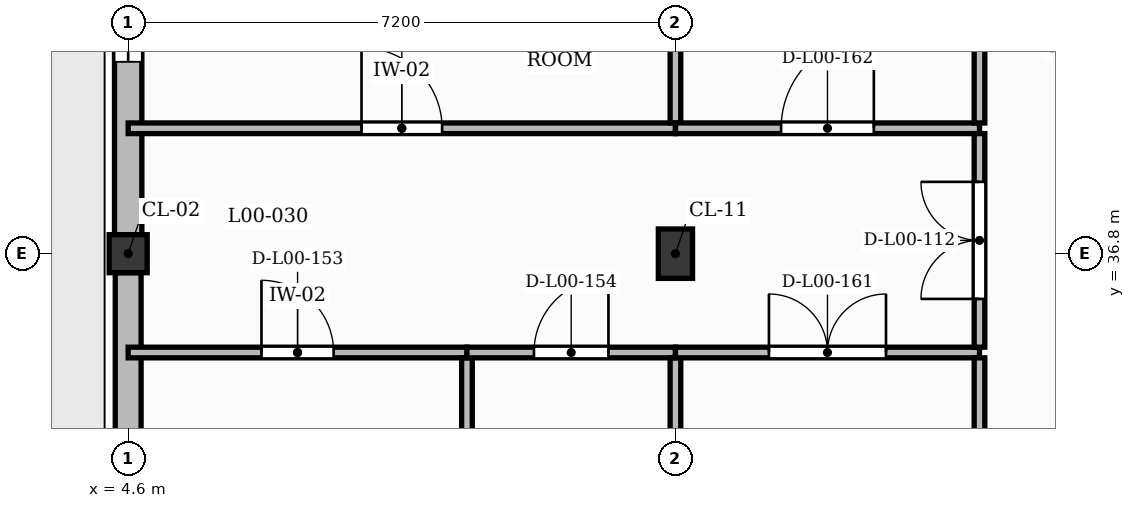
"""IFC4 building model, lengths in metres.
Left out: names, types, materials, properties, quantities, classifications, styles, units other than length and angle.
Written with IfcOpenShell. Run it as: python <this file> out.ifc"""

import sys

from ifc_helpers import new_model, si_unit, direction, frame, frame_2d, origin, origin_2d, place, context, subcontext, project, spatial, rectangle, extrude, element, fill, save


model = new_model("IFC4")
c1 = context("Model", 3, precision=1e-05, world=origin(), true_north=direction((0.0, 1.0)))
c2 = subcontext(c1, "Body", "Model", "MODEL_VIEW")
j1 = project(units=[si_unit("LENGTHUNIT", "METRE"), si_unit("PLANEANGLEUNIT", "RADIAN")], contexts=[c1])
p1 = place(None, origin())
s1 = spatial("IfcSite", under=j1, at=p1, CompositionType="ELEMENT")
p2 = place(p1, origin())
s2 = spatial("IfcBuilding", under=s1, at=p2, CompositionType="ELEMENT")
p3 = place(p2, origin())
s3 = spatial("IfcBuildingStorey", under=s2, at=p3, CompositionType="ELEMENT", Elevation=0.0)
p4 = place(p3, frame((4.6, 36.8, 0.0), z_axis=(0.0, 0.0, 1.0), x_axis=(1.0, 0.0, 0.0)))
e1 = element("IfcColumn", 1, at=p4, inside=s3, PredefinedType="COLUMN", context=c2, shape_type="SweptSolid", body=[
    extrude(rectangle(XDim=0.5, YDim=0.5, at=origin_2d()), origin(), (0.0, 0.0, 1.0), 4.2),
])
p5 = place(p3, frame((11.8, 36.8, 0.0), z_axis=(0.0, 0.0, 1.0), x_axis=(1.0, 0.0, 0.0)))
e2 = element("IfcColumn", 2, at=p5, inside=s3, PredefinedType="COLUMN", context=c2, shape_type="SweptSolid", body=[
    extrude(rectangle(XDim=0.45, YDim=0.65, at=origin_2d()), origin(), (0.0, 0.0, 1.0), 4.2),
])
p6 = place(p3, frame((4.6, 27.5, 0.0), z_axis=(0.0, 0.0, 1.0), x_axis=(0.0, 1.0, 0.0)))
e3 = element("IfcWall", 3, at=p6, inside=s3, PredefinedType="SOLIDWALL", context=c2, shape_type="SweptSolid", body=[
    extrude(rectangle(XDim=9.05, YDim=0.34, at=frame_2d((4.525, 0.0))), origin(), (0.0, 0.0, 1.0), 3.68),
])
p7 = place(p6, frame((2.12, 0.0, 1.0)))
e4 = element("IfcOpeningElement", 4, at=p7, cuts=e3, PredefinedType="OPENING", context=c2, shape_type="SweptSolid", body=[
    extrude(rectangle(XDim=1.6, YDim=2.2, at=frame_2d((0.8, 1.1))), frame((0.0, 0.18, 0.0), z_axis=(0.0, -1.0, 0.0), x_axis=(1.0, 0.0, 0.0)), (0.0, 0.0, 1.0), 0.36),
])
p8 = place(p6, frame((4.4, 0.0, 1.0)))
e5 = element("IfcOpeningElement", 5, at=p8, cuts=e3, PredefinedType="OPENING", context=c2, shape_type="SweptSolid", body=[
    extrude(rectangle(XDim=1.6, YDim=2.2, at=frame_2d((0.8, 1.1))), frame((0.0, 0.18, 0.0), z_axis=(0.0, -1.0, 0.0), x_axis=(1.0, 0.0, 0.0)), (0.0, 0.0, 1.0), 0.36),
])
p9 = place(p3, frame((4.6, 37.05, 0.0), z_axis=(0.0, 0.0, 1.0), x_axis=(0.0, 1.0, 0.0)))
e6 = element("IfcWall", 6, at=p9, inside=s3, PredefinedType="SOLIDWALL", context=c2, shape_type="SweptSolid", body=[
    extrude(rectangle(XDim=8.1, YDim=0.36, at=frame_2d((4.05, 0.0))), origin(), (0.0, 0.0, 1.0), 3.68),
])
p10 = place(p9, frame((2.274, 0.0, 1.0)))
e7 = element("IfcOpeningElement", 7, at=p10, cuts=e6, PredefinedType="OPENING", context=c2, shape_type="SweptSolid", body=[
    extrude(rectangle(XDim=1.08, YDim=1.95, at=frame_2d((0.54, 0.975))), frame((0.0, 0.19, 0.0), z_axis=(0.0, -1.0, 0.0), x_axis=(1.0, 0.0, 0.0)), (0.0, 0.0, 1.0), 0.38),
])
p11 = place(p9, frame((5.104, 0.0, 1.0)))
e8 = element("IfcOpeningElement", 8, at=p11, cuts=e6, PredefinedType="OPENING", context=c2, shape_type="SweptSolid", body=[
    extrude(rectangle(XDim=2.0, YDim=2.2, at=frame_2d((1.0, 1.1))), frame((0.0, 0.19, 0.0), z_axis=(0.0, -1.0, 0.0), x_axis=(1.0, 0.0, 0.0)), (0.0, 0.0, 1.0), 0.38),
])
p12 = place(p3, frame((4.6, 35.5, 0.0), z_axis=(0.0, 0.0, 1.0), x_axis=(1.0, 0.0, 0.0)))
e9 = element("IfcWall", 9, at=p12, inside=s3, PredefinedType="PARTITIONING", context=c2, shape_type="SweptSolid", body=[
    extrude(rectangle(XDim=4.457, YDim=0.14, at=frame_2d((2.229, 0.0))), origin(), (0.0, 0.0, 1.0), 4.18),
])
p13 = place(p12, frame((1.753, 0.0, 0.0)))
e10 = element("IfcOpeningElement", 10, at=p13, cuts=e9, PredefinedType="OPENING", context=c2, shape_type="SweptSolid", body=[
    extrude(rectangle(XDim=0.95, YDim=2.1, at=frame_2d((0.475, 1.05))), frame((0.0, 0.08, 0.0), z_axis=(0.0, -1.0, 0.0), x_axis=(1.0, 0.0, 0.0)), (0.0, 0.0, 1.0), 0.16),
])
p14 = place(p3, frame((4.6, 38.45, 0.0), z_axis=(0.0, 0.0, 1.0), x_axis=(1.0, 0.0, 0.0)))
e11 = element("IfcWall", 11, at=p14, inside=s3, PredefinedType="PARTITIONING", context=c2, shape_type="SweptSolid", body=[
    extrude(rectangle(XDim=7.2, YDim=0.14, at=frame_2d((3.6, 0.0))), origin(), (0.0, 0.0, 1.0), 4.18),
])
p15 = place(p14, frame((3.07, 0.0, 0.0)))
e12 = element("IfcOpeningElement", 12, at=p15, cuts=e11, PredefinedType="OPENING", context=c2, shape_type="SweptSolid", body=[
    extrude(rectangle(XDim=1.06, YDim=2.15, at=frame_2d((0.53, 1.075))), frame((0.0, 0.08, 0.0), z_axis=(0.0, -1.0, 0.0), x_axis=(1.0, 0.0, 0.0)), (0.0, 0.0, 1.0), 0.16),
])
p16 = place(p3, frame((9.057, 27.2, 0.0), z_axis=(0.0, 0.0, 1.0), x_axis=(0.0, 1.0, 0.0)))
e13 = element("IfcWall", 13, at=p16, inside=s3, PredefinedType="PARTITIONING", context=c2, shape_type="SweptSolid", body=[
    extrude(rectangle(XDim=8.23, YDim=0.14, at=frame_2d((4.115, 0.0))), origin(), (0.0, 0.0, 1.0), 4.18),
])
p17 = place(p3, frame((9.057, 35.5, 0.0), z_axis=(0.0, 0.0, 1.0), x_axis=(1.0, 0.0, 0.0)))
e14 = element("IfcWall", 14, at=p17, inside=s3, PredefinedType="PARTITIONING", context=c2, shape_type="SweptSolid", body=[
    extrude(rectangle(XDim=2.743, YDim=0.14, at=frame_2d((1.372, 0.0))), origin(), (0.0, 0.0, 1.0), 4.18),
])
p18 = place(p17, frame((0.882, 0.0, 0.0)))
e15 = element("IfcOpeningElement", 15, at=p18, cuts=e14, PredefinedType="OPENING", context=c2, shape_type="SweptSolid", body=[
    extrude(rectangle(XDim=0.98, YDim=2.15, at=frame_2d((0.49, 1.075))), frame((0.0, 0.08, 0.0), z_axis=(0.0, -1.0, 0.0), x_axis=(1.0, 0.0, 0.0)), (0.0, 0.0, 1.0), 0.16),
])
p19 = place(p3, frame((11.8, 30.075, 0.0), z_axis=(0.0, 0.0, 1.0), x_axis=(0.0, 1.0, 0.0)))
e16 = element("IfcWall", 16, at=p19, inside=s3, PredefinedType="PARTITIONING", context=c2, shape_type="SweptSolid", body=[
    extrude(rectangle(XDim=5.355, YDim=0.14, at=frame_2d((2.677, 0.0))), origin(), (0.0, 0.0, 1.0), 3.4),
])
p20 = place(p3, frame((11.8, 35.5, 0.0), z_axis=(0.0, 0.0, 1.0), x_axis=(1.0, 0.0, 0.0)))
e17 = element("IfcWall", 17, at=p20, inside=s3, PredefinedType="PARTITIONING", context=c2, shape_type="SweptSolid", body=[
    extrude(rectangle(XDim=4.0, YDim=0.14, at=frame_2d((2.0, 0.0))), origin(), (0.0, 0.0, 1.0), 4.18),
])
p21 = place(p20, frame((1.23, 0.0, 0.0)))
e18 = element("IfcOpeningElement", 18, at=p21, cuts=e17, PredefinedType="OPENING", context=c2, shape_type="SweptSolid", body=[
    extrude(rectangle(XDim=1.54, YDim=2.25, at=frame_2d((0.77, 1.125))), frame((0.0, 0.08, 0.0), z_axis=(0.0, -1.0, 0.0), x_axis=(1.0, 0.0, 0.0)), (0.0, 0.0, 1.0), 0.16),
])
p22 = place(p3, frame((11.8, 38.52, 0.0), z_axis=(0.0, 0.0, 1.0), x_axis=(0.0, 1.0, 0.0)))
e19 = element("IfcWall", 19, at=p22, inside=s3, PredefinedType="PARTITIONING", context=c2, shape_type="SweptSolid", body=[
    extrude(rectangle(XDim=2.626, YDim=0.14, at=frame_2d((1.313, 0.0))), origin(), (0.0, 0.0, 1.0), 3.5),
])
p23 = place(p3, frame((11.8, 38.45, 0.0), z_axis=(0.0, 0.0, 1.0), x_axis=(1.0, 0.0, 0.0)))
e20 = element("IfcWall", 20, at=p23, inside=s3, PredefinedType="PARTITIONING", context=c2, shape_type="SweptSolid", body=[
    extrude(rectangle(XDim=4.0, YDim=0.14, at=frame_2d((2.0, 0.0))), origin(), (0.0, 0.0, 1.0), 4.18),
])
p24 = place(p23, frame((1.39, 0.0, 0.0)))
e21 = element("IfcOpeningElement", 21, at=p24, cuts=e20, PredefinedType="OPENING", context=c2, shape_type="SweptSolid", body=[
    extrude(rectangle(XDim=1.22, YDim=2.1, at=frame_2d((0.61, 1.05))), frame((0.0, 0.08, 0.0), z_axis=(0.0, -1.0, 0.0), x_axis=(1.0, 0.0, 0.0)), (0.0, 0.0, 1.0), 0.16),
])
p25 = place(p3, frame((15.8, 30.075, 0.0), z_axis=(0.0, 0.0, 1.0), x_axis=(0.0, 1.0, 0.0)))
e22 = element("IfcWall", 22, at=p25, inside=s3, PredefinedType="PARTITIONING", context=c2, shape_type="SweptSolid", body=[
    extrude(rectangle(XDim=5.355, YDim=0.14, at=frame_2d((2.677, 0.0))), origin(), (0.0, 0.0, 1.0), 4.18),
])
p26 = place(p3, frame((15.8, 35.57, 0.0), z_axis=(0.0, 0.0, 1.0), x_axis=(0.0, 1.0, 0.0)))
e23 = element("IfcWall", 23, at=p26, inside=s3, PredefinedType="PARTITIONING", context=c2, shape_type="SweptSolid", body=[
    extrude(rectangle(XDim=2.81, YDim=0.14, at=frame_2d((1.405, 0.0))), origin(), (0.0, 0.0, 1.0), 4.18),
])
p27 = place(p26, frame((0.635, 0.0, 0.0)))
e24 = element("IfcOpeningElement", 24, at=p27, cuts=e23, PredefinedType="OPENING", context=c2, shape_type="SweptSolid", body=[
    extrude(rectangle(XDim=1.54, YDim=2.25, at=frame_2d((0.77, 1.125))), frame((0.0, 0.08, 0.0), z_axis=(0.0, -1.0, 0.0), x_axis=(1.0, 0.0, 0.0)), (0.0, 0.0, 1.0), 0.16),
])
p28 = place(p3, frame((15.8, 38.52, 0.0), z_axis=(0.0, 0.0, 1.0), x_axis=(0.0, 1.0, 0.0)))
e25 = element("IfcWall", 25, at=p28, inside=s3, PredefinedType="PARTITIONING", context=c2, shape_type="SweptSolid", body=[
    extrude(rectangle(XDim=2.626, YDim=0.14, at=frame_2d((1.313, 0.0))), origin(), (0.0, 0.0, 1.0), 4.18),
])
p29 = place(p10, origin())
e26 = element("IfcWindow", 26, at=p29, inside=s3, PartitioningType="SINGLE_PANEL", PredefinedType="WINDOW", context=c2, shape_type="SweptSolid", body=[
    extrude(rectangle(XDim=1.08, YDim=1.95, at=frame_2d((0.54, 0.975))), frame((0.0, 0.03, 0.0), z_axis=(0.0, -1.0, 0.0), x_axis=(1.0, 0.0, 0.0)), (0.0, 0.0, 1.0), 0.06),
])
fill(e7, e26)
p30 = place(p27, origin())
e27 = element("IfcDoor", 27, at=p30, inside=s3, OperationType="DOUBLE_DOOR_SINGLE_SWING", PredefinedType="DOOR", context=c2, shape_type="SweptSolid", body=[
    extrude(rectangle(XDim=1.54, YDim=2.25, at=frame_2d((0.77, 1.125))), frame((0.0, 0.025, 0.0), z_axis=(0.0, -1.0, 0.0), x_axis=(1.0, 0.0, 0.0)), (0.0, 0.0, 1.0), 0.05),
])
fill(e24, e27)
p31 = place(p13, origin())
e28 = element("IfcDoor", 28, at=p31, inside=s3, OperationType="SINGLE_SWING_LEFT", PredefinedType="DOOR", context=c2, shape_type="SweptSolid", body=[
    extrude(rectangle(XDim=0.95, YDim=2.1, at=frame_2d((0.475, 1.05))), frame((0.0, 0.025, 0.0), z_axis=(0.0, -1.0, 0.0), x_axis=(1.0, 0.0, 0.0)), (0.0, 0.0, 1.0), 0.05),
])
fill(e10, e28)
p32 = place(p18, origin())
e29 = element("IfcDoor", 29, at=p32, inside=s3, OperationType="SINGLE_SWING_RIGHT", PredefinedType="DOOR", context=c2, shape_type="SweptSolid", body=[
    extrude(rectangle(XDim=0.98, YDim=2.15, at=frame_2d((0.49, 1.075))), frame((0.0, 0.025, 0.0), z_axis=(0.0, -1.0, 0.0), x_axis=(1.0, 0.0, 0.0)), (0.0, 0.0, 1.0), 0.05),
])
fill(e15, e29)
p33 = place(p15, origin())
e30 = element("IfcDoor", 30, at=p33, inside=s3, OperationType="SINGLE_SWING_LEFT", PredefinedType="DOOR", context=c2, shape_type="SweptSolid", body=[
    extrude(rectangle(XDim=1.06, YDim=2.15, at=frame_2d((0.53, 1.075))), frame((0.0, 0.025, 0.0), z_axis=(0.0, -1.0, 0.0), x_axis=(1.0, 0.0, 0.0)), (0.0, 0.0, 1.0), 0.05),
])
fill(e12, e30)
p34 = place(p21, origin())
e31 = element("IfcDoor", 31, at=p34, inside=s3, OperationType="DOUBLE_DOOR_SINGLE_SWING", PredefinedType="DOOR", context=c2, shape_type="SweptSolid", body=[
    extrude(rectangle(XDim=1.54, YDim=2.25, at=frame_2d((0.77, 1.125))), frame((0.0, 0.025, 0.0), z_axis=(0.0, -1.0, 0.0), x_axis=(1.0, 0.0, 0.0)), (0.0, 0.0, 1.0), 0.05),
])
fill(e18, e31)
p35 = place(p24, origin())
e32 = element("IfcDoor", 32, at=p35, inside=s3, OperationType="SINGLE_SWING_RIGHT", PredefinedType="DOOR", context=c2, shape_type="SweptSolid", body=[
    extrude(rectangle(XDim=1.22, YDim=2.1, at=frame_2d((0.61, 1.05))), frame((0.0, 0.025, 0.0), z_axis=(0.0, -1.0, 0.0), x_axis=(1.0, 0.0, 0.0)), (0.0, 0.0, 1.0), 0.05),
])
fill(e21, e32)
save(model, sys.argv[1])
